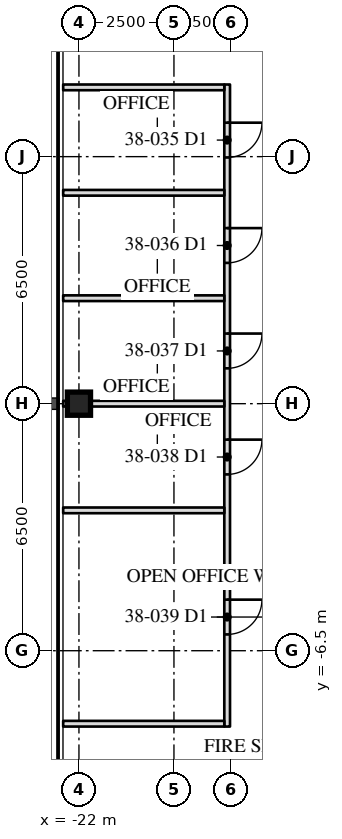
"""IFC4 building model, lengths in metres.
Left out: names, types, materials, properties, quantities, classifications, styles, units other than length and angle.
Written with IfcOpenShell. Run it as: python <this file> out.ifc"""

import sys

from ifc_helpers import new_model, si_unit, direction, frame, frame_2d, origin, origin_2d, place, context, subcontext, project, spatial, rectangle, hollow_rectangle, extrude, element, fill, save


model = new_model("IFC4")
c1 = context("Model", 3, precision=1e-05, world=origin(), true_north=direction((0.0, 1.0)))
c2 = subcontext(c1, "Body", "Model", "MODEL_VIEW")
j1 = project(units=[si_unit("LENGTHUNIT", "METRE"), si_unit("PLANEANGLEUNIT", "RADIAN")], contexts=[c1])
p1 = place(None, origin())
s1 = spatial("IfcSite", under=j1, at=p1, CompositionType="ELEMENT")
p2 = place(p1, origin())
s2 = spatial("IfcBuilding", under=s1, at=p2, CompositionType="ELEMENT")
p3 = place(p2, frame((0.0, 0.0, 162.3)))
s3 = spatial("IfcBuildingStorey", under=s2, at=p3, CompositionType="ELEMENT", Elevation=162.3)
p4 = place(p3, frame((-22.0, 0.0, 0.0), z_axis=(0.0, 0.0, 1.0), x_axis=(0.0, 1.0, 0.0)))
e1 = element("IfcColumn", 1, at=p4, inside=s3, PredefinedType="COLUMN", context=c2, shape_type="SweptSolid", body=[
    extrude(hollow_rectangle(XDim=0.61, YDim=0.61, WallThickness=0.076, at=origin_2d()), origin(), (0.0, 0.0, 1.0), 4.1),
])
p5 = place(p3, frame((-18.1, 8.398, 0.0), z_axis=(0.0, 0.0, 1.0), x_axis=(0.0, -1.0, 0.0)))
e2 = element("IfcWall", 2, at=p5, inside=s3, PredefinedType="PARTITIONING", context=c2, shape_type="SweptSolid", body=[
    extrude(rectangle(XDim=16.894, YDim=0.15, at=frame_2d((8.447, 0.0))), origin(), (0.0, 0.0, 1.0), 3.91),
])
p6 = place(p5, frame((1.004, 0.0, 0.0)))
e3 = element("IfcOpeningElement", 3, at=p6, cuts=e2, PredefinedType="OPENING", context=c2, shape_type="SweptSolid", body=[
    extrude(rectangle(XDim=0.915, YDim=2.134, at=frame_2d((0.458, 1.067))), frame((0.0, 0.085, 0.0), z_axis=(0.0, -1.0, 0.0), x_axis=(1.0, 0.0, 0.0)), (0.0, 0.0, 1.0), 0.17),
])
p7 = place(p5, frame((3.779, 0.0, 0.0)))
e4 = element("IfcOpeningElement", 4, at=p7, cuts=e2, PredefinedType="OPENING", context=c2, shape_type="SweptSolid", body=[
    extrude(rectangle(XDim=0.915, YDim=2.134, at=frame_2d((0.458, 1.067))), frame((0.0, 0.085, 0.0), z_axis=(0.0, -1.0, 0.0), x_axis=(1.0, 0.0, 0.0)), (0.0, 0.0, 1.0), 0.17),
])
p8 = place(p5, frame((6.553, 0.0, 0.0)))
e5 = element("IfcOpeningElement", 5, at=p8, cuts=e2, PredefinedType="OPENING", context=c2, shape_type="SweptSolid", body=[
    extrude(rectangle(XDim=0.915, YDim=2.134, at=frame_2d((0.458, 1.067))), frame((0.0, 0.085, 0.0), z_axis=(0.0, -1.0, 0.0), x_axis=(1.0, 0.0, 0.0)), (0.0, 0.0, 1.0), 0.17),
])
p9 = place(p5, frame((9.344, 0.0, 0.0)))
e6 = element("IfcOpeningElement", 6, at=p9, cuts=e2, PredefinedType="OPENING", context=c2, shape_type="SweptSolid", body=[
    extrude(rectangle(XDim=0.915, YDim=2.134, at=frame_2d((0.458, 1.067))), frame((0.0, 0.085, 0.0), z_axis=(0.0, -1.0, 0.0), x_axis=(1.0, 0.0, 0.0)), (0.0, 0.0, 1.0), 0.17),
])
p10 = place(p5, frame((13.554, 0.0, 0.0)))
e7 = element("IfcOpeningElement", 7, at=p10, cuts=e2, PredefinedType="OPENING", context=c2, shape_type="SweptSolid", body=[
    extrude(rectangle(XDim=0.915, YDim=2.134, at=frame_2d((0.458, 1.067))), frame((0.0, 0.085, 0.0), z_axis=(0.0, -1.0, 0.0), x_axis=(1.0, 0.0, 0.0)), (0.0, 0.0, 1.0), 0.17),
])
for number, where, z_axis, x_axis in (
    (8, (-18.175, 8.323, 0.0), (0.0, 0.0, 1.0), (-1.0, 0.0, 0.0)),
    (9, (-18.175, 5.549, 0.0), (0.0, 0.0, 1.0), (-1.0, 0.0, 0.0)),
    (10, (-18.175, 2.775, 0.0), (0.0, 0.0, 1.0), (-1.0, 0.0, 0.0)),
):
    element("IfcWall", number, at=place(p3, frame(where, z_axis=z_axis, x_axis=x_axis)), inside=s3, PredefinedType="PARTITIONING", context=c2, shape_type="SweptSolid", body=[
        extrude(rectangle(XDim=4.24, YDim=0.15, at=frame_2d((2.12, 0.0))), origin(), (0.0, 0.0, 1.0), 3.91),
    ])
p11 = place(p3, frame((-18.175, 0.0, 0.0), z_axis=(0.0, 0.0, 1.0), x_axis=(-1.0, 0.0, 0.0)))
e11 = element("IfcWall", 11, at=p11, inside=s3, PredefinedType="PARTITIONING", context=c2, shape_type="SweptSolid", body=[
    extrude(rectangle(XDim=4.24, YDim=0.15, at=frame_2d((2.12, 0.0))), origin(), (0.0, 0.0, 1.0), 3.326),
])
for number, where, z_axis, x_axis in (
    (12, (-18.175, -2.807, 0.0), (0.0, 0.0, 1.0), (-1.0, 0.0, 0.0)),
    (13, (-18.175, -8.421, 0.0), (0.0, 0.0, 1.0), (-1.0, 0.0, 0.0)),
):
    element("IfcWall", number, at=place(p3, frame(where, z_axis=z_axis, x_axis=x_axis)), inside=s3, PredefinedType="PARTITIONING", context=c2, shape_type="SweptSolid", body=[
        extrude(rectangle(XDim=4.24, YDim=0.15, at=frame_2d((2.12, 0.0))), origin(), (0.0, 0.0, 1.0), 3.91),
    ])
p12 = place(p6, origin())
e14 = element("IfcDoor", 14, at=p12, inside=s3, OperationType="SINGLE_SWING_LEFT", PredefinedType="DOOR", context=c2, shape_type="SweptSolid", body=[
    extrude(rectangle(XDim=0.915, YDim=2.134, at=frame_2d((0.458, 1.067))), frame((0.0, 0.025, 0.0), z_axis=(0.0, -1.0, 0.0), x_axis=(1.0, 0.0, 0.0)), (0.0, 0.0, 1.0), 0.05),
])
fill(e3, e14)
p13 = place(p7, origin())
e15 = element("IfcDoor", 15, at=p13, inside=s3, OperationType="SINGLE_SWING_LEFT", PredefinedType="DOOR", context=c2, shape_type="SweptSolid", body=[
    extrude(rectangle(XDim=0.915, YDim=2.134, at=frame_2d((0.458, 1.067))), frame((0.0, 0.025, 0.0), z_axis=(0.0, -1.0, 0.0), x_axis=(1.0, 0.0, 0.0)), (0.0, 0.0, 1.0), 0.05),
])
fill(e4, e15)
p14 = place(p8, origin())
e16 = element("IfcDoor", 16, at=p14, inside=s3, OperationType="SINGLE_SWING_LEFT", PredefinedType="DOOR", context=c2, shape_type="SweptSolid", body=[
    extrude(rectangle(XDim=0.915, YDim=2.134, at=frame_2d((0.458, 1.067))), frame((0.0, 0.025, 0.0), z_axis=(0.0, -1.0, 0.0), x_axis=(1.0, 0.0, 0.0)), (0.0, 0.0, 1.0), 0.05),
])
fill(e5, e16)
p15 = place(p9, origin())
e17 = element("IfcDoor", 17, at=p15, inside=s3, OperationType="SINGLE_SWING_LEFT", PredefinedType="DOOR", context=c2, shape_type="SweptSolid", body=[
    extrude(rectangle(XDim=0.915, YDim=2.134, at=frame_2d((0.458, 1.067))), frame((0.0, 0.025, 0.0), z_axis=(0.0, -1.0, 0.0), x_axis=(1.0, 0.0, 0.0)), (0.0, 0.0, 1.0), 0.05),
])
fill(e6, e17)
p16 = place(p10, origin())
e18 = element("IfcDoor", 18, at=p16, inside=s3, OperationType="SINGLE_SWING_LEFT", PredefinedType="DOOR", context=c2, shape_type="SweptSolid", body=[
    extrude(rectangle(XDim=0.915, YDim=2.134, at=frame_2d((0.458, 1.067))), frame((0.0, 0.025, 0.0), z_axis=(0.0, -1.0, 0.0), x_axis=(1.0, 0.0, 0.0)), (0.0, 0.0, 1.0), 0.05),
])
fill(e7, e18)
save(model, sys.argv[1])
